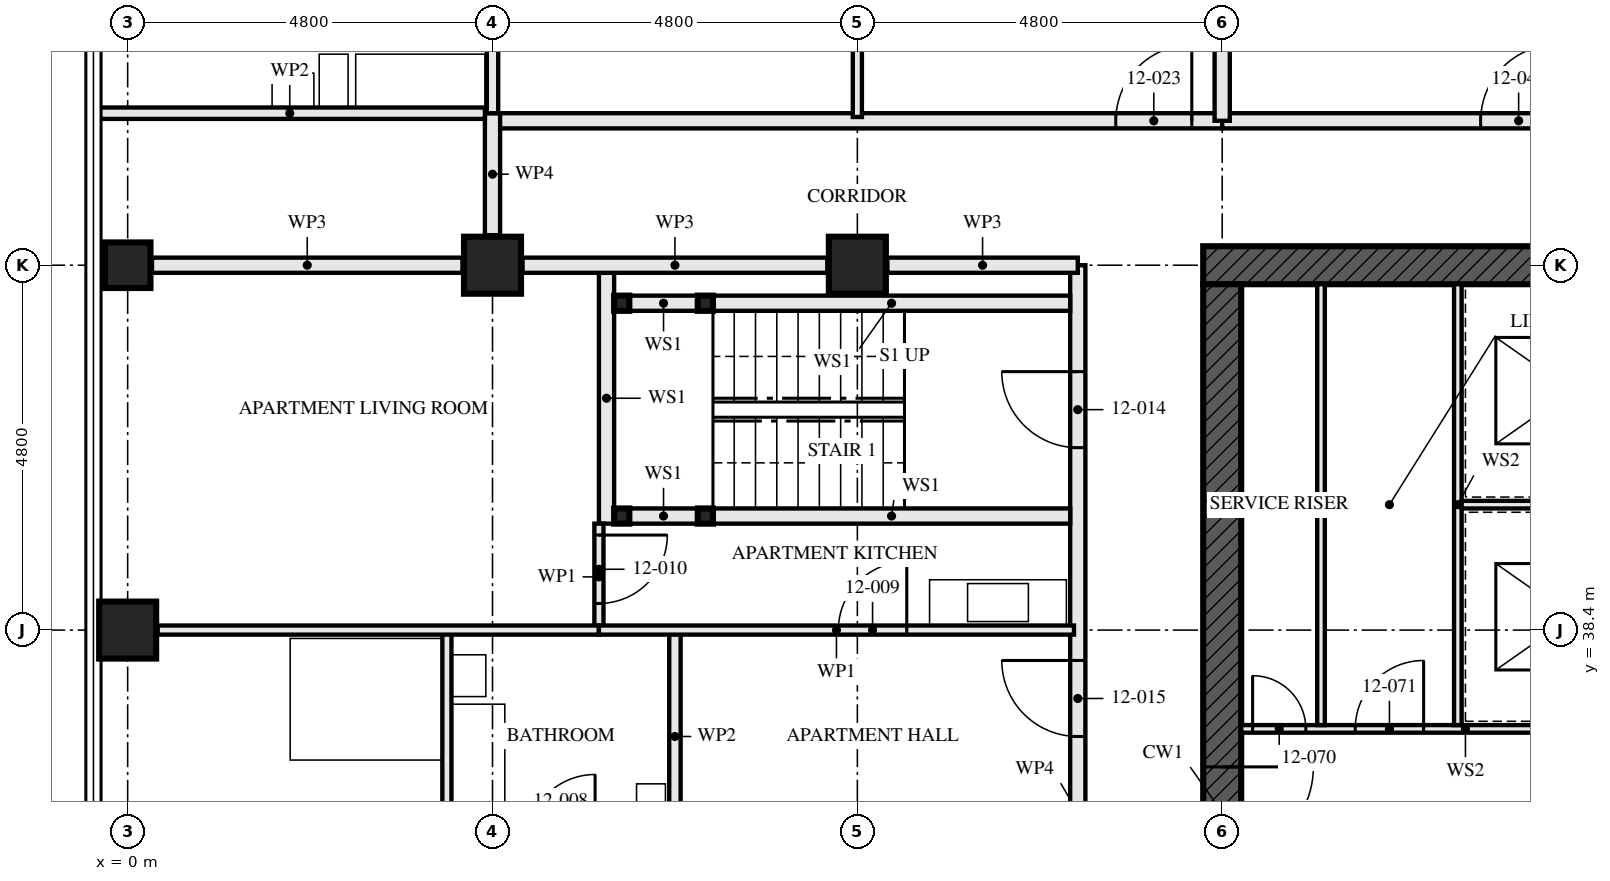
"""IFC4 building model, lengths in metres.
Left out: names, types, materials, properties, quantities, classifications, styles, units other than length and angle.
Written with IfcOpenShell. Run it as: python <this file> out.ifc"""

import sys

from ifc_helpers import new_model, si_unit, direction, frame, frame_2d, origin, origin_2d, place, context, subcontext, project, spatial, rectangle, hollow_rectangle, extrude, element, fill, save


model = new_model("IFC4")
c1 = context("Model", 3, precision=1e-05, world=origin(), true_north=direction((0.0, 1.0)))
c2 = subcontext(c1, "Body", "Model", "MODEL_VIEW")
j1 = project(units=[si_unit("LENGTHUNIT", "METRE"), si_unit("PLANEANGLEUNIT", "RADIAN")], contexts=[c1])
p1 = place(None, origin())
s1 = spatial("IfcSite", under=j1, at=p1, CompositionType="ELEMENT")
p2 = place(p1, origin())
s2 = spatial("IfcBuilding", under=s1, at=p2, CompositionType="ELEMENT")
p3 = place(p2, frame((0.0, 0.0, 48.0)))
s3 = spatial("IfcBuildingStorey", under=s2, at=p3, CompositionType="ELEMENT", Elevation=48.0)
p4 = place(p3, frame((0.0, 38.4, 0.0), z_axis=(0.0, 0.0, 1.0), x_axis=(1.0, 0.0, 0.0)))
e1 = element("IfcColumn", 1, at=p4, inside=s3, PredefinedType="COLUMN", context=c2, shape_type="SweptSolid", body=[
    extrude(hollow_rectangle(XDim=0.75, YDim=0.75, WallThickness=0.08, at=origin_2d()), origin(), (0.0, 0.0, 1.0), 3.5),
])
p5 = place(p3, frame((0.0, 43.2, 0.0), z_axis=(0.0, 0.0, 1.0), x_axis=(0.0, 1.0, 0.0)))
e2 = element("IfcColumn", 2, at=p5, inside=s3, PredefinedType="COLUMN", context=c2, shape_type="SweptSolid", body=[
    extrude(hollow_rectangle(XDim=0.6, YDim=0.6, WallThickness=0.08, at=origin_2d()), origin(), (0.0, 0.0, 1.0), 3.5),
])
for number, where, z_axis, x_axis in (
    (3, (4.8, 43.2, 0.0), (0.0, 0.0, 1.0), (0.0, 1.0, 0.0)),
    (4, (9.6, 43.2, 0.0), (0.0, 0.0, 1.0), (0.0, 1.0, 0.0)),
):
    element("IfcColumn", number, at=place(p3, frame(where, z_axis=z_axis, x_axis=x_axis)), inside=s3, PredefinedType="COLUMN", context=c2, shape_type="SweptSolid", body=[
        extrude(hollow_rectangle(XDim=0.75, YDim=0.75, WallThickness=0.08, at=origin_2d()), origin(), (0.0, 0.0, 1.0), 3.5),
    ])
p6 = place(p3, frame((29.05, 43.2, -0.17), z_axis=(0.0, 0.0, 1.0), x_axis=(-1.0, 0.0, 0.0)))
e5 = element("IfcWall", 5, at=p6, inside=s3, PredefinedType="SHEAR", context=c2, shape_type="SweptSolid", body=[
    extrude(rectangle(XDim=14.9, YDim=0.5, at=frame_2d((7.45, 0.0))), origin(), (0.0, 0.0, 1.0), 3.5),
])
p7 = place(p6, frame((6.85, 0.0, 0.17)))
e6 = element("IfcOpeningElement", 6, at=p7, cuts=e5, PredefinedType="OPENING", context=c2, shape_type="SweptSolid", body=[
    extrude(rectangle(XDim=1.2, YDim=2.1, at=frame_2d((0.6, 1.05))), frame((0.0, 0.26, 0.0), z_axis=(0.0, -1.0, 0.0), x_axis=(1.0, 0.0, 0.0)), (0.0, 0.0, 1.0), 0.521),
])
p8 = place(p3, frame((14.4, 42.95, -0.17), z_axis=(0.0, 0.0, 1.0), x_axis=(0.0, -1.0, 0.0)))
e7 = element("IfcWall", 7, at=p8, inside=s3, PredefinedType="SHEAR", context=c2, shape_type="SweptSolid", body=[
    extrude(rectangle(XDim=13.9, YDim=0.5, at=frame_2d((6.95, 0.0))), origin(), (0.0, 0.0, 1.0), 3.5),
])
p9 = place(p8, frame((6.35, 0.0, 0.17)))
e8 = element("IfcOpeningElement", 8, at=p9, cuts=e7, PredefinedType="OPENING", context=c2, shape_type="SweptSolid", body=[
    extrude(rectangle(XDim=1.2, YDim=2.1, at=frame_2d((0.6, 1.05))), frame((0.0, 0.26, 0.0), z_axis=(0.0, -1.0, 0.0), x_axis=(1.0, 0.0, 0.0)), (0.0, 0.0, 1.0), 0.521),
])
for number, where, z_axis, x_axis in (
    (9, (6.5, 42.7, 0.0), (0.0, 0.0, 1.0), (1.0, 0.0, 0.0)),
    (10, (6.5, 39.9, 0.0), (0.0, 0.0, 1.0), (1.0, 0.0, 0.0)),
    (11, (7.6, 42.7, 0.0), (0.0, 0.0, 1.0), (1.0, 0.0, 0.0)),
    (12, (7.6, 39.9, 0.0), (0.0, 0.0, 1.0), (1.0, 0.0, 0.0)),
):
    element("IfcColumn", number, at=place(p3, frame(where, z_axis=z_axis, x_axis=x_axis)), inside=s3, PredefinedType="COLUMN", context=c2, shape_type="SweptSolid", body=[
        extrude(hollow_rectangle(XDim=0.2, YDim=0.2, WallThickness=0.008, at=origin_2d()), origin(), (0.0, 0.0, 1.0), 3.33),
    ])
p10 = place(p3, frame((6.6, 42.7, 0.0), z_axis=(0.0, 0.0, 1.0), x_axis=(1.0, 0.0, 0.0)))
e13 = element("IfcWall", 13, at=p10, inside=s3, PredefinedType="SOLIDWALL", context=c2, shape_type="SweptSolid", body=[
    extrude(rectangle(XDim=0.9, YDim=0.2, at=frame_2d((0.45, 0.0))), origin(), (0.0, 0.0, 1.0), 2.99),
])
p11 = place(p3, frame((7.7, 42.7, 0.0), z_axis=(0.0, 0.0, 1.0), x_axis=(1.0, 0.0, 0.0)))
e14 = element("IfcWall", 14, at=p11, inside=s3, PredefinedType="SOLIDWALL", context=c2, shape_type="SweptSolid", body=[
    extrude(rectangle(XDim=4.7, YDim=0.2, at=frame_2d((2.35, 0.0))), origin(), (0.0, 0.0, 1.0), 2.99),
])
p12 = place(p3, frame((6.6, 39.9, 0.0), z_axis=(0.0, 0.0, 1.0), x_axis=(1.0, 0.0, 0.0)))
e15 = element("IfcWall", 15, at=p12, inside=s3, PredefinedType="SOLIDWALL", context=c2, shape_type="SweptSolid", body=[
    extrude(rectangle(XDim=0.9, YDim=0.2, at=frame_2d((0.45, 0.0))), origin(), (0.0, 0.0, 1.0), 2.99),
])
p13 = place(p3, frame((7.7, 39.9, 0.0), z_axis=(0.0, 0.0, 1.0), x_axis=(1.0, 0.0, 0.0)))
e16 = element("IfcWall", 16, at=p13, inside=s3, PredefinedType="SOLIDWALL", context=c2, shape_type="SweptSolid", body=[
    extrude(rectangle(XDim=4.7, YDim=0.2, at=frame_2d((2.35, 0.0))), origin(), (0.0, 0.0, 1.0), 2.99),
])
p14 = place(p3, frame((6.3, 43.1, 0.0), z_axis=(0.0, 0.0, 1.0), x_axis=(0.0, -1.0, 0.0)))
e17 = element("IfcWall", 17, at=p14, inside=s3, PredefinedType="SOLIDWALL", context=c2, shape_type="SweptSolid", body=[
    extrude(rectangle(XDim=3.3, YDim=0.2, at=frame_2d((1.65, 0.0))), origin(), (0.0, 0.0, 1.0), 3.33),
])
p15 = place(p3, frame((7.2, 38.4, 0.0), z_axis=(0.0, 0.0, 1.0), x_axis=(0.0, -1.0, 0.0)))
e18 = element("IfcWall", 18, at=p15, inside=s3, PredefinedType="PARTITIONING", context=c2, shape_type="SweptSolid", body=[
    extrude(rectangle(XDim=2.8, YDim=0.15, at=frame_2d((1.4, 0.0))), origin(), (0.0, 0.0, 1.0), 3.33),
])
p16 = place(p3, frame((6.2, 38.4, 0.0), z_axis=(0.0, 0.0, 1.0), x_axis=(1.0, 0.0, 0.0)))
e19 = element("IfcWall", 19, at=p16, inside=s3, PredefinedType="PARTITIONING", context=c2, shape_type="SweptSolid", body=[
    extrude(rectangle(XDim=6.25, YDim=0.12, at=frame_2d((3.125, 0.0))), origin(), (0.0, 0.0, 1.0), 2.55),
])
p17 = place(p16, frame((3.15, 0.0, 0.0)))
e20 = element("IfcOpeningElement", 20, at=p17, cuts=e19, PredefinedType="OPENING", context=c2, shape_type="SweptSolid", body=[
    extrude(rectangle(XDim=0.9, YDim=2.1, at=frame_2d((0.45, 1.05))), frame((0.0, 0.071, 0.0), z_axis=(0.0, -1.0, 0.0), x_axis=(1.0, 0.0, 0.0)), (0.0, 0.0, 1.0), 0.141),
])
p18 = place(p3, frame((6.2, 39.8, 0.0), z_axis=(0.0, 0.0, 1.0), x_axis=(0.0, -1.0, 0.0)))
e21 = element("IfcWall", 21, at=p18, inside=s3, PredefinedType="PARTITIONING", context=c2, shape_type="SweptSolid", body=[
    extrude(rectangle(XDim=1.4, YDim=0.12, at=frame_2d((0.7, 0.0))), origin(), (0.0, 0.0, 1.0), 3.33),
])
p19 = place(p18, frame((0.15, 0.0, 0.0)))
e22 = element("IfcOpeningElement", 22, at=p19, cuts=e21, PredefinedType="OPENING", context=c2, shape_type="SweptSolid", body=[
    extrude(rectangle(XDim=0.9, YDim=2.1, at=frame_2d((0.45, 1.05))), frame((0.0, 0.071, 0.0), z_axis=(0.0, -1.0, 0.0), x_axis=(1.0, 0.0, 0.0)), (0.0, 0.0, 1.0), 0.141),
])
p20 = place(p3, frame((4.2, 38.4, 0.0), z_axis=(0.0, 0.0, 1.0), x_axis=(0.0, -1.0, 0.0)))
e23 = element("IfcWall", 23, at=p20, inside=s3, PredefinedType="PARTITIONING", context=c2, shape_type="SweptSolid", body=[
    extrude(rectangle(XDim=4.8, YDim=0.12, at=frame_2d((2.4, 0.0))), origin(), (0.0, 0.0, 1.0), 3.33),
])
p21 = place(p20, frame((3.45, 0.0, 0.0)))
e24 = element("IfcOpeningElement", 24, at=p21, cuts=e23, PredefinedType="OPENING", context=c2, shape_type="SweptSolid", body=[
    extrude(rectangle(XDim=0.9, YDim=2.1, at=frame_2d((0.45, 1.05))), frame((0.0, 0.071, 0.0), z_axis=(0.0, -1.0, 0.0), x_axis=(1.0, 0.0, 0.0)), (0.0, 0.0, 1.0), 0.141),
])
p22 = place(p3, frame((0.395, 38.4, 0.0), z_axis=(0.0, 0.0, 1.0), x_axis=(1.0, 0.0, 0.0)))
e25 = element("IfcWall", 25, at=p22, inside=s3, PredefinedType="PARTITIONING", context=c2, shape_type="SweptSolid", body=[
    extrude(rectangle(XDim=5.805, YDim=0.12, at=frame_2d((2.902, 0.0))), origin(), (0.0, 0.0, 1.0), 2.55),
])
p23 = place(p3, frame((12.5, 43.2, 0.0), z_axis=(0.0, 0.0, 1.0), x_axis=(0.0, -1.0, 0.0)))
e26 = element("IfcWall", 26, at=p23, inside=s3, PredefinedType="PARTITIONING", context=c2, shape_type="SweptSolid", body=[
    extrude(rectangle(XDim=14.4, YDim=0.2, at=frame_2d((7.2, 0.0))), origin(), (0.0, 0.0, 1.0), 2.55),
])
p24 = place(p23, frame((1.4, 0.0, 0.0)))
e27 = element("IfcOpeningElement", 27, at=p24, cuts=e26, PredefinedType="OPENING", context=c2, shape_type="SweptSolid", body=[
    extrude(rectangle(XDim=1.0, YDim=2.1, at=frame_2d((0.5, 1.05))), frame((0.0, 0.111, 0.0), z_axis=(0.0, -1.0, 0.0), x_axis=(1.0, 0.0, 0.0)), (0.0, 0.0, 1.0), 0.221),
])
p25 = place(p23, frame((5.2, 0.0, 0.0)))
e28 = element("IfcOpeningElement", 28, at=p25, cuts=e26, PredefinedType="OPENING", context=c2, shape_type="SweptSolid", body=[
    extrude(rectangle(XDim=1.0, YDim=2.1, at=frame_2d((0.5, 1.05))), frame((0.0, 0.111, 0.0), z_axis=(0.0, -1.0, 0.0), x_axis=(1.0, 0.0, 0.0)), (0.0, 0.0, 1.0), 0.221),
])
p26 = place(p23, frame((10.0, 0.0, 0.0)))
e29 = element("IfcOpeningElement", 29, at=p26, cuts=e26, PredefinedType="OPENING", context=c2, shape_type="SweptSolid", body=[
    extrude(rectangle(XDim=1.0, YDim=2.1, at=frame_2d((0.5, 1.05))), frame((0.0, 0.111, 0.0), z_axis=(0.0, -1.0, 0.0), x_axis=(1.0, 0.0, 0.0)), (0.0, 0.0, 1.0), 0.221),
])
p27 = place(p3, frame((4.8, 48.2, 0.0), z_axis=(0.0, 0.0, 1.0), x_axis=(0.0, -1.0, 0.0)))
e30 = element("IfcWall", 30, at=p27, inside=s3, PredefinedType="PARTITIONING", context=c2, shape_type="SweptSolid", body=[
    extrude(rectangle(XDim=3.0, YDim=0.15, at=frame_2d((1.5, 0.0))), origin(), (0.0, 0.0, 1.0), 2.55),
])
p28 = place(p27, frame((1.05, 0.0, 0.0)))
e31 = element("IfcOpeningElement", 31, at=p28, cuts=e30, PredefinedType="OPENING", context=c2, shape_type="SweptSolid", body=[
    extrude(rectangle(XDim=0.9, YDim=2.1, at=frame_2d((0.45, 1.05))), frame((0.0, 0.085, 0.0), z_axis=(0.0, -1.0, 0.0), x_axis=(1.0, 0.0, 0.0)), (0.0, 0.0, 1.0), 0.171),
])
p29 = place(p3, frame((9.6, 53.4, 0.0), z_axis=(0.0, 0.0, 1.0), x_axis=(0.0, -1.0, 0.0)))
e32 = element("IfcWall", 32, at=p29, inside=s3, PredefinedType="PARTITIONING", context=c2, shape_type="SweptSolid", body=[
    extrude(rectangle(XDim=8.25, YDim=0.12, at=frame_2d((4.125, 0.0))), origin(), (0.0, 0.0, 1.0), 2.55),
])
p30 = place(p29, frame((5.15, 0.0, 0.0)))
e33 = element("IfcOpeningElement", 33, at=p30, cuts=e32, PredefinedType="OPENING", context=c2, shape_type="SweptSolid", body=[
    extrude(rectangle(XDim=0.9, YDim=2.1, at=frame_2d((0.45, 1.05))), frame((0.0, 0.071, 0.0), z_axis=(0.0, -1.0, 0.0), x_axis=(1.0, 0.0, 0.0)), (0.0, 0.0, 1.0), 0.141),
])
p31 = place(p3, frame((14.4, 45.1, 0.0), z_axis=(0.0, 0.0, 1.0), x_axis=(-1.0, 0.0, 0.0)))
e34 = element("IfcWall", 34, at=p31, inside=s3, PredefinedType="PARTITIONING", context=c2, shape_type="SweptSolid", body=[
    extrude(rectangle(XDim=9.6, YDim=0.2, at=frame_2d((4.8, 0.0))), origin(), (0.0, 0.0, 1.0), 3.33),
])
p32 = place(p31, frame((0.4, 0.0, 0.0)))
e35 = element("IfcOpeningElement", 35, at=p32, cuts=e34, PredefinedType="OPENING", context=c2, shape_type="SweptSolid", body=[
    extrude(rectangle(XDim=1.0, YDim=2.1, at=frame_2d((0.5, 1.05))), frame((0.0, 0.111, 0.0), z_axis=(0.0, -1.0, 0.0), x_axis=(1.0, 0.0, 0.0)), (0.0, 0.0, 1.0), 0.221),
])
p33 = place(p3, frame((4.8, 45.2, 0.0), z_axis=(0.0, 0.0, 1.0), x_axis=(0.0, -1.0, 0.0)))
e36 = element("IfcWall", 36, at=p33, inside=s3, PredefinedType="PARTITIONING", context=c2, shape_type="SweptSolid", body=[
    extrude(rectangle(XDim=1.605, YDim=0.2, at=frame_2d((0.802, 0.0))), origin(), (0.0, 0.0, 1.0), 3.33),
])
p34 = place(p3, frame((28.8, 45.1, 0.0), z_axis=(0.0, 0.0, 1.0), x_axis=(-1.0, 0.0, 0.0)))
e37 = element("IfcWall", 37, at=p34, inside=s3, PredefinedType="PARTITIONING", context=c2, shape_type="SweptSolid", body=[
    extrude(rectangle(XDim=14.4, YDim=0.2, at=frame_2d((7.2, 0.0))), origin(), (0.0, 0.0, 1.0), 3.33),
])
p35 = place(p34, frame((0.4, 0.0, 0.0)))
e38 = element("IfcOpeningElement", 38, at=p35, cuts=e37, PredefinedType="OPENING", context=c2, shape_type="SweptSolid", body=[
    extrude(rectangle(XDim=1.0, YDim=2.1, at=frame_2d((0.5, 1.05))), frame((0.0, 0.111, 0.0), z_axis=(0.0, -1.0, 0.0), x_axis=(1.0, 0.0, 0.0)), (0.0, 0.0, 1.0), 0.221),
])
p36 = place(p34, frame((5.2, 0.0, 0.0)))
e39 = element("IfcOpeningElement", 39, at=p36, cuts=e37, PredefinedType="OPENING", context=c2, shape_type="SweptSolid", body=[
    extrude(rectangle(XDim=1.0, YDim=2.1, at=frame_2d((0.5, 1.05))), frame((0.0, 0.111, 0.0), z_axis=(0.0, -1.0, 0.0), x_axis=(1.0, 0.0, 0.0)), (0.0, 0.0, 1.0), 0.221),
])
p37 = place(p34, frame((10.0, 0.0, 0.0)))
e40 = element("IfcOpeningElement", 40, at=p37, cuts=e37, PredefinedType="OPENING", context=c2, shape_type="SweptSolid", body=[
    extrude(rectangle(XDim=1.0, YDim=2.1, at=frame_2d((0.5, 1.05))), frame((0.0, 0.111, 0.0), z_axis=(0.0, -1.0, 0.0), x_axis=(1.0, 0.0, 0.0)), (0.0, 0.0, 1.0), 0.221),
])
p38 = place(p3, frame((15.7, 37.15, 0.0), z_axis=(0.0, 0.0, 1.0), x_axis=(0.0, 1.0, 0.0)))
e41 = element("IfcWall", 41, at=p38, inside=s3, PredefinedType="SOLIDWALL", context=c2, shape_type="SweptSolid", body=[
    extrude(rectangle(XDim=5.8, YDim=0.1, at=frame_2d((2.9, 0.0))), origin(), (0.0, 0.0, 1.0), 3.33),
])
p39 = place(p3, frame((14.65, 37.1, 0.0), z_axis=(0.0, 0.0, 1.0), x_axis=(1.0, 0.0, 0.0)))
e42 = element("IfcWall", 42, at=p39, inside=s3, PredefinedType="SOLIDWALL", context=c2, shape_type="SweptSolid", body=[
    extrude(rectangle(XDim=5.9, YDim=0.1, at=frame_2d((2.95, 0.0))), origin(), (0.0, 0.0, 1.0), 3.33),
])
p40 = place(p39, frame((0.15, 0.0, 0.0)))
e43 = element("IfcOpeningElement", 43, at=p40, cuts=e42, PredefinedType="OPENING", context=c2, shape_type="SweptSolid", body=[
    extrude(rectangle(XDim=0.7, YDim=2.1, at=frame_2d((0.35, 1.05))), frame((0.0, 0.061, 0.0), z_axis=(0.0, -1.0, 0.0), x_axis=(1.0, 0.0, 0.0)), (0.0, 0.0, 1.0), 0.121),
])
p41 = place(p39, frame((1.5, 0.0, 0.0)))
e44 = element("IfcOpeningElement", 44, at=p41, cuts=e42, PredefinedType="OPENING", context=c2, shape_type="SweptSolid", body=[
    extrude(rectangle(XDim=0.9, YDim=2.1, at=frame_2d((0.45, 1.05))), frame((0.0, 0.061, 0.0), z_axis=(0.0, -1.0, 0.0), x_axis=(1.0, 0.0, 0.0)), (0.0, 0.0, 1.0), 0.121),
])
p42 = place(p3, frame((17.5, 37.15, 0.0), z_axis=(0.0, 0.0, 1.0), x_axis=(0.0, 1.0, 0.0)))
e45 = element("IfcWall", 45, at=p42, inside=s3, PredefinedType="SOLIDWALL", context=c2, shape_type="SweptSolid", body=[
    extrude(rectangle(XDim=5.8, YDim=0.1, at=frame_2d((2.9, 0.0))), origin(), (0.0, 0.0, 1.0), 3.33),
])
p43 = place(p3, frame((17.55, 40.05, 0.0), z_axis=(0.0, 0.0, 1.0), x_axis=(1.0, 0.0, 0.0)))
e46 = element("IfcWall", 46, at=p43, inside=s3, PredefinedType="SOLIDWALL", context=c2, shape_type="SweptSolid", body=[
    extrude(rectangle(XDim=2.9, YDim=0.1, at=frame_2d((1.45, 0.0))), origin(), (0.0, 0.0, 1.0), 3.33),
])
p44 = place(p3, frame((12.5, 43.2, 0.0), z_axis=(0.0, 0.0, 1.0), x_axis=(-1.0, 0.0, 0.0)))
e47 = element("IfcWall", 47, at=p44, inside=s3, PredefinedType="PARTITIONING", context=c2, shape_type="SweptSolid", body=[
    extrude(rectangle(XDim=2.505, YDim=0.2, at=frame_2d((1.252, 0.0))), origin(), (0.0, 0.0, 1.0), 2.32),
])
p45 = place(p3, frame((9.205, 43.2, 0.0), z_axis=(0.0, 0.0, 1.0), x_axis=(-1.0, 0.0, 0.0)))
e48 = element("IfcWall", 48, at=p45, inside=s3, PredefinedType="PARTITIONING", context=c2, shape_type="SweptSolid", body=[
    extrude(rectangle(XDim=4.01, YDim=0.2, at=frame_2d((2.005, 0.0))), origin(), (0.0, 0.0, 1.0), 2.32),
])
p46 = place(p3, frame((4.405, 43.2, 0.0), z_axis=(0.0, 0.0, 1.0), x_axis=(-1.0, 0.0, 0.0)))
e49 = element("IfcWall", 49, at=p46, inside=s3, PredefinedType="PARTITIONING", context=c2, shape_type="SweptSolid", body=[
    extrude(rectangle(XDim=4.085, YDim=0.2, at=frame_2d((2.042, 0.0))), origin(), (0.0, 0.0, 1.0), 2.32),
])
p47 = place(p3, frame((14.4, 45.1, 0.0), z_axis=(0.0, 0.0, 1.0), x_axis=(0.0, 1.0, 0.0)))
e50 = element("IfcWall", 50, at=p47, inside=s3, PredefinedType="PARTITIONING", context=c2, shape_type="SweptSolid", body=[
    extrude(rectangle(XDim=2.555, YDim=0.2, at=frame_2d((1.277, 0.0))), origin(), (0.0, 0.0, 1.0), 2.32),
])
p48 = place(p3, frame((4.7, 45.2, 0.0), z_axis=(0.0, 0.0, 1.0), x_axis=(-1.0, 0.0, 0.0)))
e51 = element("IfcWall", 51, at=p48, inside=s3, PredefinedType="PARTITIONING", context=c2, shape_type="SweptSolid", body=[
    extrude(rectangle(XDim=5.135, YDim=0.15, at=frame_2d((2.567, 0.0))), origin(), (0.0, 0.0, 1.0), 2.32),
])
p49 = place(p17, origin())
e52 = element("IfcDoor", 52, at=p49, inside=s3, OperationType="SINGLE_SWING_LEFT", PredefinedType="DOOR", context=c2, shape_type="SweptSolid", body=[
    extrude(rectangle(XDim=0.9, YDim=2.1, at=frame_2d((0.45, 1.05))), frame((0.0, 0.022, 0.0), z_axis=(0.0, -1.0, 0.0), x_axis=(1.0, 0.0, 0.0)), (0.0, 0.0, 1.0), 0.044),
])
fill(e20, e52)
p50 = place(p19, origin())
e53 = element("IfcDoor", 53, at=p50, inside=s3, OperationType="SINGLE_SWING_RIGHT", PredefinedType="DOOR", context=c2, shape_type="SweptSolid", body=[
    extrude(rectangle(XDim=0.9, YDim=2.1, at=frame_2d((0.45, 1.05))), frame((0.0, 0.022, 0.0), z_axis=(0.0, -1.0, 0.0), x_axis=(1.0, 0.0, 0.0)), (0.0, 0.0, 1.0), 0.044),
])
fill(e22, e53)
p51 = place(p24, frame((1.0, 0.0, 0.0), z_axis=(0.0, 0.0, 1.0), x_axis=(-1.0, 0.0, 0.0)))
e54 = element("IfcDoor", 54, at=p51, inside=s3, OperationType="SINGLE_SWING_LEFT", PredefinedType="DOOR", context=c2, shape_type="SweptSolid", body=[
    extrude(rectangle(XDim=1.0, YDim=2.1, at=frame_2d((0.5, 1.05))), frame((0.0, 0.032, 0.0), z_axis=(0.0, -1.0, 0.0), x_axis=(1.0, 0.0, 0.0)), (0.0, 0.0, 1.0), 0.064),
])
fill(e27, e54)
p52 = place(p25, frame((1.0, 0.0, 0.0), z_axis=(0.0, 0.0, 1.0), x_axis=(-1.0, 0.0, 0.0)))
e55 = element("IfcDoor", 55, at=p52, inside=s3, OperationType="SINGLE_SWING_LEFT", PredefinedType="DOOR", context=c2, shape_type="SweptSolid", body=[
    extrude(rectangle(XDim=1.0, YDim=2.1, at=frame_2d((0.5, 1.05))), frame((0.0, 0.027, 0.0), z_axis=(0.0, -1.0, 0.0), x_axis=(1.0, 0.0, 0.0)), (0.0, 0.0, 1.0), 0.054),
])
fill(e28, e55)
p53 = place(p32, frame((1.0, 0.0, 0.0), z_axis=(0.0, 0.0, 1.0), x_axis=(-1.0, 0.0, 0.0)))
e56 = element("IfcDoor", 56, at=p53, inside=s3, OperationType="SINGLE_SWING_LEFT", PredefinedType="DOOR", context=c2, shape_type="SweptSolid", body=[
    extrude(rectangle(XDim=1.0, YDim=2.1, at=frame_2d((0.5, 1.05))), frame((0.0, 0.027, 0.0), z_axis=(0.0, -1.0, 0.0), x_axis=(1.0, 0.0, 0.0)), (0.0, 0.0, 1.0), 0.054),
])
fill(e35, e56)
p54 = place(p37, frame((1.0, 0.0, 0.0), z_axis=(0.0, 0.0, 1.0), x_axis=(-1.0, 0.0, 0.0)))
e57 = element("IfcDoor", 57, at=p54, inside=s3, OperationType="SINGLE_SWING_LEFT", PredefinedType="DOOR", context=c2, shape_type="SweptSolid", body=[
    extrude(rectangle(XDim=1.0, YDim=2.1, at=frame_2d((0.5, 1.05))), frame((0.0, 0.027, 0.0), z_axis=(0.0, -1.0, 0.0), x_axis=(1.0, 0.0, 0.0)), (0.0, 0.0, 1.0), 0.054),
])
fill(e40, e57)
p55 = place(p40, origin())
e58 = element("IfcDoor", 58, at=p55, inside=s3, OperationType="SINGLE_SWING_RIGHT", PredefinedType="DOOR", context=c2, shape_type="SweptSolid", body=[
    extrude(rectangle(XDim=0.7, YDim=2.1, at=frame_2d((0.35, 1.05))), frame((0.0, 0.027, 0.0), z_axis=(0.0, -1.0, 0.0), x_axis=(1.0, 0.0, 0.0)), (0.0, 0.0, 1.0), 0.054),
])
fill(e43, e58)
p56 = place(p41, origin())
e59 = element("IfcDoor", 59, at=p56, inside=s3, OperationType="SINGLE_SWING_LEFT", PredefinedType="DOOR", context=c2, shape_type="SweptSolid", body=[
    extrude(rectangle(XDim=0.9, YDim=2.1, at=frame_2d((0.45, 1.05))), frame((0.0, 0.027, 0.0), z_axis=(0.0, -1.0, 0.0), x_axis=(1.0, 0.0, 0.0)), (0.0, 0.0, 1.0), 0.054),
])
fill(e44, e59)
p57 = place(p9, origin())
e60 = element("IfcDoor", 60, at=p57, inside=s3, OperationType="SINGLE_SWING_LEFT", PredefinedType="DOOR", context=c2, shape_type="SweptSolid", body=[
    extrude(rectangle(XDim=1.2, YDim=2.1, at=frame_2d((0.6, 1.05))), frame((0.0, 0.027, 0.0), z_axis=(0.0, -1.0, 0.0), x_axis=(1.0, 0.0, 0.0)), (0.0, 0.0, 1.0), 0.054),
])
fill(e8, e60)
save(model, sys.argv[1])
